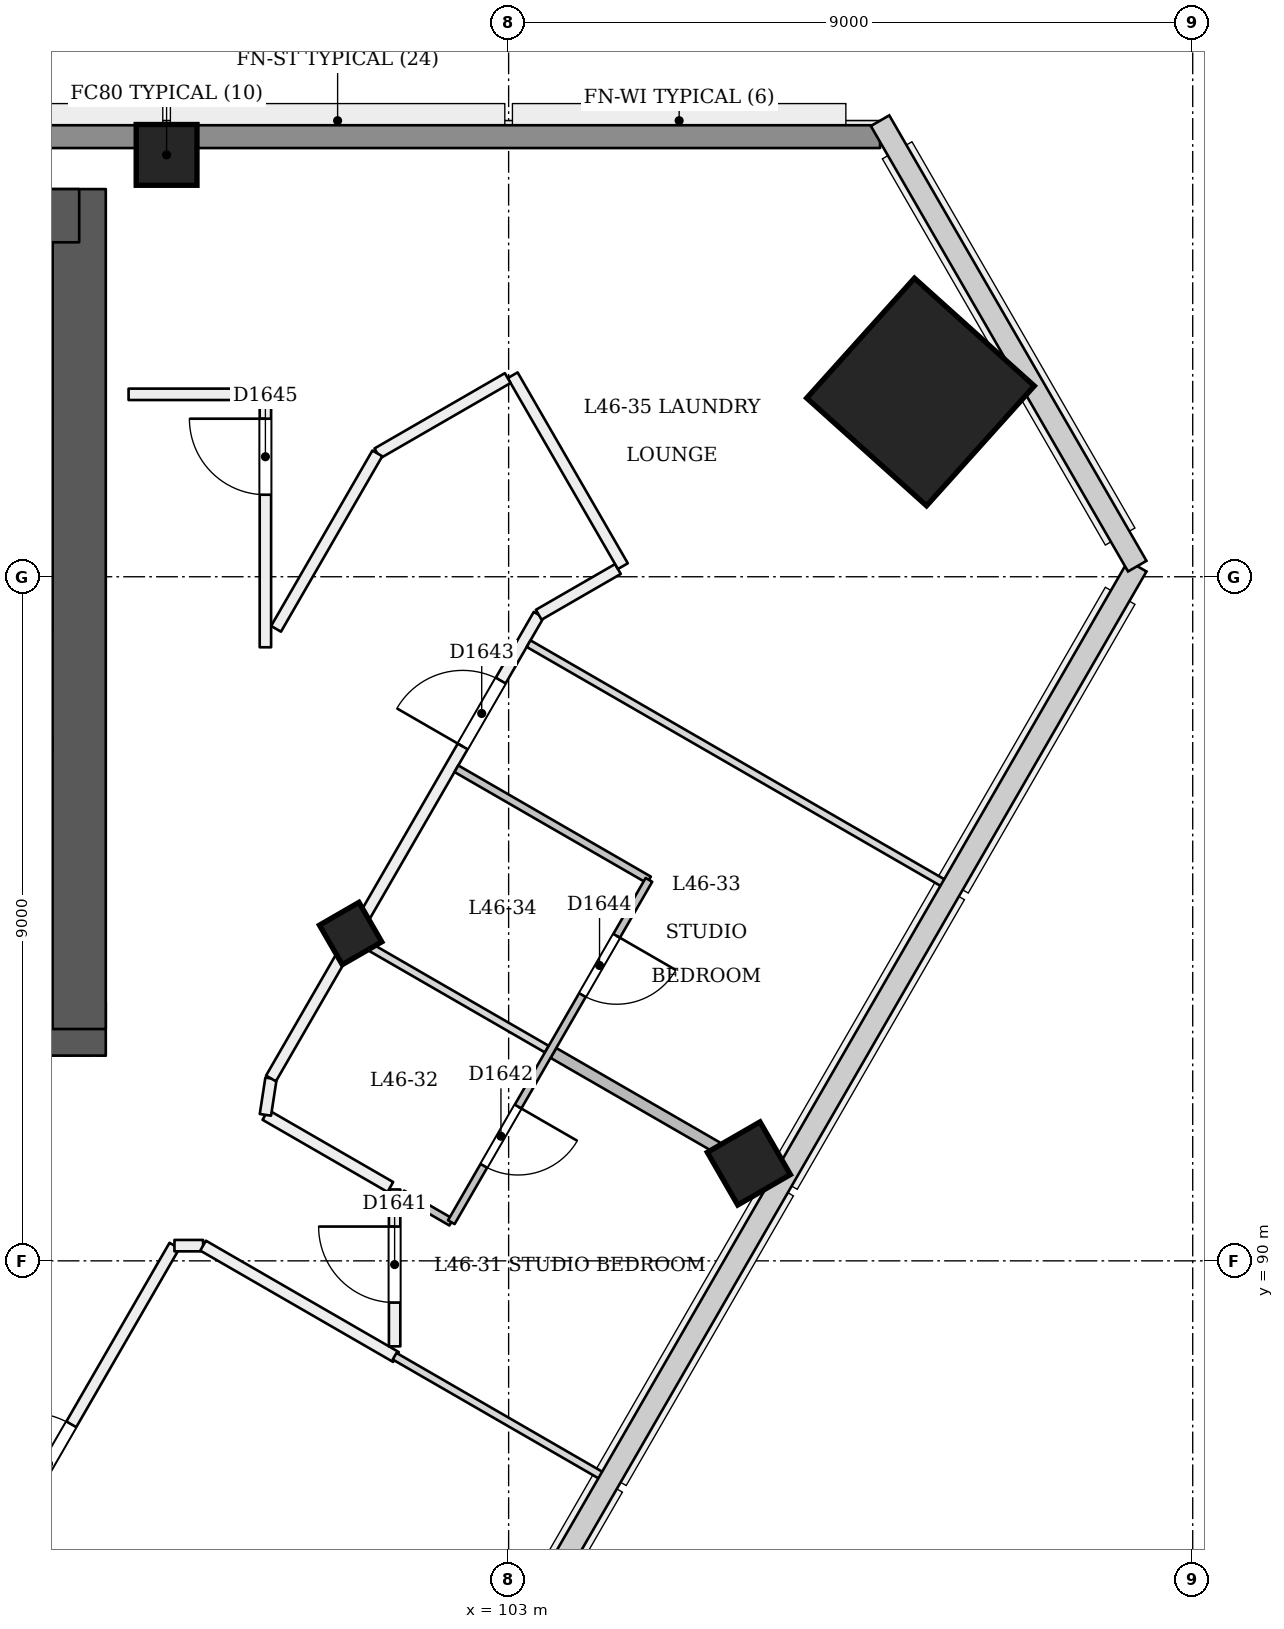
"""IFC4 building model, lengths in metres.
Left out: names, types, materials, properties, quantities, classifications, styles, units other than length and angle.
Written with IfcOpenShell. Run it as: python <this file> out.ifc"""

import sys

from ifc_helpers import new_model, si_unit, direction, frame, frame_2d, origin, origin_2d, place, context, subcontext, project, spatial, rectangle, extrude, element, fill, save


model = new_model("IFC4")
c1 = context("Model", 3, precision=1e-05, world=origin(), true_north=direction((0.0, 1.0)))
c2 = subcontext(c1, "Body", "Model", "MODEL_VIEW")
j1 = project(units=[si_unit("LENGTHUNIT", "METRE"), si_unit("PLANEANGLEUNIT", "RADIAN")], contexts=[c1])
p1 = place(None, origin())
s1 = spatial("IfcSite", under=j1, at=p1, CompositionType="ELEMENT")
p2 = place(p1, origin())
s2 = spatial("IfcBuilding", under=s1, at=p2, CompositionType="ELEMENT")
p3 = place(p2, frame((0.0, 0.0, 178.2)))
s3 = spatial("IfcBuildingStorey", under=s2, at=p3, CompositionType="ELEMENT", Elevation=178.2)
p4 = place(p3, frame((72.65, 93.05, 0.0), z_axis=(0.0, 0.0, 1.0), x_axis=(1.0, 0.0, 0.0)))
e1 = element("IfcWall", 1, at=p4, inside=s3, PredefinedType="SHEAR", context=c2, shape_type="SweptSolid", body=[
    extrude(rectangle(XDim=25.05, YDim=0.7, at=frame_2d((12.525, 0.0))), origin(), (0.0, 0.0, 1.0), 3.6),
])
p5 = place(p4, frame((1.15, 0.0, 0.0)))
e2 = element("IfcOpeningElement", 2, at=p5, cuts=e1, PredefinedType="OPENING", context=c2, shape_type="SweptSolid", body=[
    extrude(rectangle(XDim=1.2, YDim=2.1, at=frame_2d((0.6, 1.05))), frame((0.0, 0.36, 0.0), z_axis=(0.0, -1.0, 0.0), x_axis=(1.0, 0.0, 0.0)), (0.0, 0.0, 1.0), 0.721),
])
p6 = place(p4, frame((3.35, 0.0, 0.0)))
e3 = element("IfcOpeningElement", 3, at=p6, cuts=e1, PredefinedType="OPENING", context=c2, shape_type="SweptSolid", body=[
    extrude(rectangle(XDim=1.2, YDim=2.1, at=frame_2d((0.6, 1.05))), frame((0.0, 0.36, 0.0), z_axis=(0.0, -1.0, 0.0), x_axis=(1.0, 0.0, 0.0)), (0.0, 0.0, 1.0), 0.721),
])
p7 = place(p4, frame((13.35, 0.0, 0.0)))
e4 = element("IfcOpeningElement", 4, at=p7, cuts=e1, PredefinedType="OPENING", context=c2, shape_type="SweptSolid", body=[
    extrude(rectangle(XDim=1.2, YDim=2.1, at=frame_2d((0.6, 1.05))), frame((0.0, 0.36, 0.0), z_axis=(0.0, -1.0, 0.0), x_axis=(1.0, 0.0, 0.0)), (0.0, 0.0, 1.0), 0.721),
])
p8 = place(p4, frame((15.312, 0.0, 0.0)))
e5 = element("IfcOpeningElement", 5, at=p8, cuts=e1, PredefinedType="OPENING", context=c2, shape_type="SweptSolid", body=[
    extrude(rectangle(XDim=1.0, YDim=2.1, at=frame_2d((0.5, 1.05))), frame((0.0, 0.36, 0.0), z_axis=(0.0, -1.0, 0.0), x_axis=(1.0, 0.0, 0.0)), (0.0, 0.0, 1.0), 0.721),
])
p9 = place(p4, frame((18.15, 0.0, 0.0)))
e6 = element("IfcOpeningElement", 6, at=p9, cuts=e1, PredefinedType="OPENING", context=c2, shape_type="SweptSolid", body=[
    extrude(rectangle(XDim=1.0, YDim=2.1, at=frame_2d((0.5, 1.05))), frame((0.0, 0.36, 0.0), z_axis=(0.0, -1.0, 0.0), x_axis=(1.0, 0.0, 0.0)), (0.0, 0.0, 1.0), 0.721),
])
p10 = place(p4, frame((21.05, 0.0, 0.0)))
e7 = element("IfcOpeningElement", 7, at=p10, cuts=e1, PredefinedType="OPENING", context=c2, shape_type="SweptSolid", body=[
    extrude(rectangle(XDim=1.0, YDim=2.1, at=frame_2d((0.5, 1.05))), frame((0.0, 0.36, 0.0), z_axis=(0.0, -1.0, 0.0), x_axis=(1.0, 0.0, 0.0)), (0.0, 0.0, 1.0), 0.721),
])
p11 = place(p4, frame((22.938, 0.0, 0.0)))
e8 = element("IfcOpeningElement", 8, at=p11, cuts=e1, PredefinedType="OPENING", context=c2, shape_type="SweptSolid", body=[
    extrude(rectangle(XDim=1.0, YDim=2.1, at=frame_2d((0.5, 1.05))), frame((0.0, 0.36, 0.0), z_axis=(0.0, -1.0, 0.0), x_axis=(1.0, 0.0, 0.0)), (0.0, 0.0, 1.0), 0.721),
])
p12 = place(p3, frame((97.35, 93.05, 0.0), z_axis=(0.0, 0.0, 1.0), x_axis=(0.0, 1.0, 0.0)))
e9 = element("IfcWall", 9, at=p12, inside=s3, PredefinedType="SHEAR", context=c2, shape_type="SweptSolid", body=[
    extrude(rectangle(XDim=11.05, YDim=0.7, at=frame_2d((5.525, 0.0))), origin(), (0.0, 0.0, 1.0), 3.6),
])
p13 = place(p3, frame((97.35, 103.75, 0.0), z_axis=(0.0, 0.0, 1.0), x_axis=(-1.0, 0.0, 0.0)))
e10 = element("IfcWall", 10, at=p13, inside=s3, PredefinedType="SHEAR", context=c2, shape_type="SweptSolid", body=[
    extrude(rectangle(XDim=25.05, YDim=0.7, at=frame_2d((12.525, 0.0))), origin(), (0.0, 0.0, 1.0), 3.6),
])
p14 = place(p3, frame((100.948, 94.26, -0.018), z_axis=(-0.022222852987, 0.038483477124, 0.999012095419), x_axis=(-0.500174611287, -0.865639447942, 0.022219459744)))
e11 = element("IfcColumn", 11, at=p14, inside=s3, PredefinedType="COLUMN", context=c2, shape_type="SweptSolid", body=[
    extrude(rectangle(XDim=0.6, YDim=0.6, at=origin_2d()), origin(), (0.0, 0.0, 1.0), 3.604),
])
p15 = place(p3, frame((108.453, 101.42, 0.0), z_axis=(-0.028401796786, 0.009286506348, 0.999553449666), x_axis=(0.498873699713, -0.866389693121, 0.022224567214)))
e12 = element("IfcColumn", 12, at=p15, inside=s3, PredefinedType="COLUMN", context=c2, shape_type="SweptSolid", body=[
    extrude(rectangle(XDim=2.12, YDim=2.12, at=origin_2d()), origin(), (0.0, 0.0, 1.0), 3.602),
])
p16 = place(p3, frame((98.5, 104.55, 0.0), z_axis=(0.0, 0.0, 1.0), x_axis=(1.0, 0.0, 0.0)))
e13 = element("IfcColumn", 13, at=p16, inside=s3, PredefinedType="COLUMN", context=c2, shape_type="SweptSolid", body=[
    extrude(rectangle(XDim=0.8, YDim=0.8, at=origin_2d()), origin(), (0.0, 0.0, 1.0), 3.6),
])
p17 = place(p3, frame((106.188, 91.234, -0.024), z_axis=(-0.02215519141, 0.038415882353, 0.999016199807), x_axis=(-0.500657414572, -0.865361484564, 0.022173278208)))
e14 = element("IfcColumn", 14, at=p17, inside=s3, PredefinedType="COLUMN", context=c2, shape_type="SweptSolid", body=[
    extrude(rectangle(XDim=0.8, YDim=0.8, at=origin_2d()), origin(), (0.0, 0.0, 1.0), 3.604),
])
p18 = place(p3, frame((85.0, 66.638, 0.0), z_axis=(0.0, 0.0, 1.0), x_axis=(0.499999498748, 0.866025693182, 0.0)))
e15 = element("IfcWall", 15, at=p18, inside=s3, PredefinedType="PARTITIONING", context=c2, shape_type="SweptSolid", body=[
    extrude(rectangle(XDim=27.207, YDim=0.15, at=frame_2d((13.604, 0.0))), origin(), (0.0, 0.0, 1.0), 2.75),
])
p19 = place(p18, frame((1.0, 0.0, 0.0)))
e16 = element("IfcOpeningElement", 16, at=p19, cuts=e15, PredefinedType="OPENING", context=c2, shape_type="SweptSolid", body=[
    extrude(rectangle(XDim=1.0, YDim=2.1, at=frame_2d((0.5, 1.05))), frame((0.0, 0.085, 0.0), z_axis=(0.0, -1.0, 0.0), x_axis=(1.0, 0.0, 0.0)), (0.0, 0.0, 1.0), 0.171),
])
p20 = place(p18, frame((7.791, 0.0, 0.0)))
e17 = element("IfcOpeningElement", 17, at=p20, cuts=e15, PredefinedType="OPENING", context=c2, shape_type="SweptSolid", body=[
    extrude(rectangle(XDim=1.0, YDim=2.1, at=frame_2d((0.5, 1.05))), frame((0.0, 0.085, 0.0), z_axis=(0.0, -1.0, 0.0), x_axis=(1.0, 0.0, 0.0)), (0.0, 0.0, 1.0), 0.171),
])
p21 = place(p18, frame((10.0, 0.0, 0.0)))
e18 = element("IfcOpeningElement", 18, at=p21, cuts=e15, PredefinedType="OPENING", context=c2, shape_type="SweptSolid", body=[
    extrude(rectangle(XDim=1.0, YDim=2.1, at=frame_2d((0.5, 1.05))), frame((0.0, 0.085, 0.0), z_axis=(0.0, -1.0, 0.0), x_axis=(1.0, 0.0, 0.0)), (0.0, 0.0, 1.0), 0.171),
])
p22 = place(p18, frame((16.791, 0.0, 0.0)))
e19 = element("IfcOpeningElement", 19, at=p22, cuts=e15, PredefinedType="OPENING", context=c2, shape_type="SweptSolid", body=[
    extrude(rectangle(XDim=1.0, YDim=2.1, at=frame_2d((0.5, 1.05))), frame((0.0, 0.085, 0.0), z_axis=(0.0, -1.0, 0.0), x_axis=(1.0, 0.0, 0.0)), (0.0, 0.0, 1.0), 0.171),
])
p23 = place(p18, frame((23.293, 0.0, 0.0)))
e20 = element("IfcOpeningElement", 20, at=p23, cuts=e15, PredefinedType="OPENING", context=c2, shape_type="SweptSolid", body=[
    extrude(rectangle(XDim=1.2, YDim=2.1, at=frame_2d((0.6, 1.05))), frame((0.0, 0.085, 0.0), z_axis=(0.0, -1.0, 0.0), x_axis=(1.0, 0.0, 0.0)), (0.0, 0.0, 1.0), 0.171),
])
p24 = place(p3, frame((98.604, 90.2, 0.0), z_axis=(0.0, 0.0, 1.0), x_axis=(1.0, 0.0, 0.0)))
e21 = element("IfcWall", 21, at=p24, inside=s3, PredefinedType="PARTITIONING", context=c2, shape_type="SweptSolid", body=[
    extrude(rectangle(XDim=0.377, YDim=0.15, at=frame_2d((0.188, 0.0))), origin(), (0.0, 0.0, 1.0), 3.15),
])
p25 = place(p3, frame((98.98, 90.2, 0.0), z_axis=(0.0, 0.0, 1.0), x_axis=(0.866034304969, -0.49998458238, 0.0)))
e22 = element("IfcWall", 22, at=p25, inside=s3, PredefinedType="PARTITIONING", context=c2, shape_type="SweptSolid", body=[
    extrude(rectangle(XDim=2.929, YDim=0.15, at=frame_2d((1.465, 0.0))), origin(), (0.0, 0.0, 1.0), 3.15),
])
p26 = place(p3, frame((101.5, 88.875, 0.0), z_axis=(0.0, 0.0, 1.0), x_axis=(0.0, 1.0, 0.0)))
e23 = element("IfcWall", 23, at=p26, inside=s3, PredefinedType="PARTITIONING", context=c2, shape_type="SweptSolid", body=[
    extrude(rectangle(XDim=2.064, YDim=0.15, at=frame_2d((1.032, 0.0))), origin(), (0.0, 0.0, 1.0), 3.15),
])
p27 = place(p26, frame((0.576, 0.0, 0.0)))
e24 = element("IfcOpeningElement", 24, at=p27, cuts=e23, PredefinedType="OPENING", context=c2, shape_type="SweptSolid", body=[
    extrude(rectangle(XDim=1.0, YDim=2.1, at=frame_2d((0.5, 1.05))), frame((0.0, 0.085, 0.0), z_axis=(0.0, -1.0, 0.0), x_axis=(1.0, 0.0, 0.0)), (0.0, 0.0, 1.0), 0.171),
])
p28 = place(p3, frame((101.444, 90.972, 0.0), z_axis=(0.0, 0.0, 1.0), x_axis=(-0.866042076863, 0.499971120268, 0.0)))
e25 = element("IfcWall", 25, at=p28, inside=s3, PredefinedType="PARTITIONING", context=c2, shape_type="SweptSolid", body=[
    extrude(rectangle(XDim=1.898, YDim=0.15, at=frame_2d((0.949, 0.0))), origin(), (0.0, 0.0, 1.0), 3.15),
])
p29 = place(p3, frame((99.8, 91.921, 0.0), z_axis=(0.0, 0.0, 1.0), x_axis=(0.152057184254, 0.988371697651, 0.0)))
e26 = element("IfcWall", 26, at=p29, inside=s3, PredefinedType="PARTITIONING", context=c2, shape_type="SweptSolid", body=[
    extrude(rectangle(XDim=0.485, YDim=0.15, at=frame_2d((0.242, 0.0))), origin(), (0.0, 0.0, 1.0), 3.15),
])
p30 = place(p3, frame((99.874, 92.4, 0.0), z_axis=(0.0, 0.0, 1.0), x_axis=(0.499982483372, 0.866035516778, 0.0)))
e27 = element("IfcWall", 27, at=p30, inside=s3, PredefinedType="PARTITIONING", context=c2, shape_type="SweptSolid", body=[
    extrude(rectangle(XDim=7.044, YDim=0.15, at=frame_2d((3.522, 0.0))), origin(), (0.0, 0.0, 1.0), 2.75),
])
p31 = place(p30, frame((5.044, 0.0, 0.0)))
e28 = element("IfcOpeningElement", 28, at=p31, cuts=e27, PredefinedType="OPENING", context=c2, shape_type="SweptSolid", body=[
    extrude(rectangle(XDim=1.0, YDim=2.1, at=frame_2d((0.5, 1.05))), frame((0.0, 0.085, 0.0), z_axis=(0.0, -1.0, 0.0), x_axis=(1.0, 0.0, 0.0)), (0.0, 0.0, 1.0), 0.171),
])
p32 = place(p3, frame((103.396, 98.5, 0.0), z_axis=(0.0, 0.0, 1.0), x_axis=(0.86605048973, 0.49995654735, 0.0)))
e29 = element("IfcWall", 29, at=p32, inside=s3, PredefinedType="PARTITIONING", context=c2, shape_type="SweptSolid", body=[
    extrude(rectangle(XDim=1.204, YDim=0.15, at=frame_2d((0.602, 0.0))), origin(), (0.0, 0.0, 1.0), 3.15),
])
p33 = place(p3, frame((104.503, 99.139, 0.0), z_axis=(0.0, 0.0, 1.0), x_axis=(-0.499987231761, 0.866032775405, 0.0)))
e30 = element("IfcWall", 30, at=p33, inside=s3, PredefinedType="PARTITIONING", context=c2, shape_type="SweptSolid", body=[
    extrude(rectangle(XDim=2.9, YDim=0.15, at=frame_2d((1.45, 0.0))), origin(), (0.0, 0.0, 1.0), 3.15),
])
p34 = place(p3, frame((102.988, 101.613, 0.0), z_axis=(0.0, 0.0, 1.0), x_axis=(-0.866050114754, -0.499957196903, 0.0)))
e31 = element("IfcWall", 31, at=p34, inside=s3, PredefinedType="PARTITIONING", context=c2, shape_type="SweptSolid", body=[
    extrude(rectangle(XDim=1.981, YDim=0.15, at=frame_2d((0.99, 0.0))), origin(), (0.0, 0.0, 1.0), 3.15),
])
p35 = place(p3, frame((101.273, 100.623, 0.0), z_axis=(0.0, 0.0, 1.0), x_axis=(-0.500010524421, -0.866019327422, 0.0)))
e32 = element("IfcWall", 32, at=p35, inside=s3, PredefinedType="PARTITIONING", context=c2, shape_type="SweptSolid", body=[
    extrude(rectangle(XDim=2.666, YDim=0.15, at=frame_2d((1.333, 0.0))), origin(), (0.0, 0.0, 1.0), 3.15),
])
p36 = place(p3, frame((99.8, 98.072, 0.0), z_axis=(0.0, 0.0, 1.0), x_axis=(0.0, 1.0, 0.0)))
e33 = element("IfcWall", 33, at=p36, inside=s3, PredefinedType="PARTITIONING", context=c2, shape_type="SweptSolid", body=[
    extrude(rectangle(XDim=3.328, YDim=0.15, at=frame_2d((1.664, 0.0))), origin(), (0.0, 0.0, 1.0), 3.15),
])
p37 = place(p36, frame((2.007, 0.0, 0.0)))
e34 = element("IfcOpeningElement", 34, at=p37, cuts=e33, PredefinedType="OPENING", context=c2, shape_type="SweptSolid", body=[
    extrude(rectangle(XDim=1.0, YDim=2.1, at=frame_2d((0.5, 1.05))), frame((0.0, 0.085, 0.0), z_axis=(0.0, -1.0, 0.0), x_axis=(1.0, 0.0, 0.0)), (0.0, 0.0, 1.0), 0.171),
])
p38 = place(p3, frame((99.725, 101.4, 0.0), z_axis=(0.0, 0.0, 1.0), x_axis=(-1.0, 0.0, 0.0)))
e35 = element("IfcWall", 35, at=p38, inside=s3, PredefinedType="PARTITIONING", context=c2, shape_type="SweptSolid", body=[
    extrude(rectangle(XDim=1.725, YDim=0.15, at=frame_2d((0.863, 0.0))), origin(), (0.0, 0.0, 1.0), 3.15),
])
p39 = place(p3, frame((104.258, 87.153, 0.0), z_axis=(0.0, 0.0, 1.0), x_axis=(-0.866017059223, 0.500014452926, 0.0)))
e36 = element("IfcWall", 36, at=p39, inside=s3, PredefinedType="PARTITIONING", context=c2, shape_type="SweptSolid", body=[
    extrude(rectangle(XDim=3.185, YDim=0.1, at=frame_2d((1.592, 0.0))), origin(), (0.0, 0.0, 1.0), 2.65),
])
p40 = place(p3, frame((102.246, 90.509, 0.0), z_axis=(0.0, 0.0, 1.0), x_axis=(-0.865896584481, 0.500223055231, 0.0)))
e37 = element("IfcWall", 37, at=p40, inside=s3, PredefinedType="PARTITIONING", context=c2, shape_type="SweptSolid", body=[
    extrude(rectangle(XDim=0.746, YDim=0.1, at=frame_2d((0.373, 0.0))), origin(), (0.0, 0.0, 1.0), 3.15),
])
p41 = place(p3, frame((106.49, 91.06, 0.0), z_axis=(0.0, 0.0, 1.0), x_axis=(-0.866032680314, 0.499987396469, 0.0)))
e38 = element("IfcWall", 38, at=p41, inside=s3, PredefinedType="PARTITIONING", context=c2, shape_type="SweptSolid", body=[
    extrude(rectangle(XDim=3.35, YDim=0.15, at=frame_2d((1.675, 0.0))), origin(), (0.0, 0.0, 1.0), 2.65),
])
p42 = place(p3, frame((103.503, 92.785, 0.0), z_axis=(0.0, 0.0, 1.0), x_axis=(-0.866076708598, 0.499911126926, 0.0)))
e39 = element("IfcWall", 39, at=p42, inside=s3, PredefinedType="PARTITIONING", context=c2, shape_type="SweptSolid", body=[
    extrude(rectangle(XDim=2.875, YDim=0.1, at=frame_2d((1.438, 0.0))), origin(), (0.0, 0.0, 1.0), 2.75),
])
p43 = place(p3, frame((102.313, 96.474, 0.0), z_axis=(0.0, 0.0, 1.0), x_axis=(0.866046596414, -0.499963291492, 0.0)))
e40 = element("IfcWall", 40, at=p43, inside=s3, PredefinedType="PARTITIONING", context=c2, shape_type="SweptSolid", body=[
    extrude(rectangle(XDim=2.925, YDim=0.1, at=frame_2d((1.462, 0.0))), origin(), (0.0, 0.0, 1.0), 3.15),
])
p44 = place(p3, frame((104.846, 95.012, 0.0), z_axis=(0.0, 0.0, 1.0), x_axis=(-0.500006934395, -0.866021400173, 0.0)))
e41 = element("IfcWall", 41, at=p44, inside=s3, PredefinedType="PARTITIONING", context=c2, shape_type="SweptSolid", body=[
    extrude(rectangle(XDim=5.2, YDim=0.1, at=frame_2d((2.6, 0.0))), origin(), (0.0, 0.0, 1.0), 2.75),
])
p45 = place(p44, frame((3.444, 0.0, 0.0)))
e42 = element("IfcOpeningElement", 42, at=p45, cuts=e41, PredefinedType="OPENING", context=c2, shape_type="SweptSolid", body=[
    extrude(rectangle(XDim=0.9, YDim=2.1, at=frame_2d((0.45, 1.05))), frame((0.0, 0.061, 0.0), z_axis=(0.0, -1.0, 0.0), x_axis=(1.0, 0.0, 0.0)), (0.0, 0.0, 1.0), 0.121),
])
p46 = place(p44, frame((0.85, 0.0, 0.0)))
e43 = element("IfcOpeningElement", 43, at=p46, cuts=e41, PredefinedType="OPENING", context=c2, shape_type="SweptSolid", body=[
    extrude(rectangle(XDim=0.9, YDim=2.1, at=frame_2d((0.45, 1.05))), frame((0.0, 0.061, 0.0), z_axis=(0.0, -1.0, 0.0), x_axis=(1.0, 0.0, 0.0)), (0.0, 0.0, 1.0), 0.121),
])
p47 = place(p3, frame((108.758, 94.947, 0.0), z_axis=(0.0, 0.0, 1.0), x_axis=(-0.866025401434, 0.500000004071, 0.0)))
e44 = element("IfcWall", 44, at=p47, inside=s3, PredefinedType="PARTITIONING", context=c2, shape_type="SweptSolid", body=[
    extrude(rectangle(XDim=6.345, YDim=0.1, at=frame_2d((3.173, 0.0))), origin(), (0.0, 0.0, 1.0), 2.65),
])
p48 = place(p3, frame((62.113, 104.79, 0.0), z_axis=(0.0, 0.0, 1.0), x_axis=(1.0, 0.0, 0.0)))
e45 = element("IfcWall", 45, at=p48, inside=s3, PredefinedType="SOLIDWALL", context=c2, shape_type="SweptSolid", body=[
    extrude(rectangle(XDim=45.773, YDim=0.3, at=frame_2d((22.887, 0.0))), origin(), (0.0, 0.0, 1.0), 2.65),
])
p49 = place(p23, origin())
e46 = element("IfcDoor", 46, at=p49, inside=s3, OperationType="SINGLE_SWING_LEFT", PredefinedType="NOTDEFINED", context=c2, shape_type="SweptSolid", body=[
    extrude(rectangle(XDim=1.2, YDim=2.1, at=frame_2d((0.6, 1.05))), frame((0.0, 0.025, 0.0), z_axis=(0.0, -1.0, 0.0), x_axis=(1.0, 0.0, 0.0)), (0.0, 0.0, 1.0), 0.05),
])
fill(e20, e46)
p50 = place(p27, origin())
e47 = element("IfcDoor", 47, at=p50, inside=s3, OperationType="SINGLE_SWING_RIGHT", PredefinedType="NOTDEFINED", context=c2, shape_type="SweptSolid", body=[
    extrude(rectangle(XDim=1.0, YDim=2.1, at=frame_2d((0.5, 1.05))), frame((0.0, 0.025, 0.0), z_axis=(0.0, -1.0, 0.0), x_axis=(1.0, 0.0, 0.0)), (0.0, 0.0, 1.0), 0.05),
])
fill(e24, e47)
p51 = place(p45, origin())
e48 = element("IfcDoor", 48, at=p51, inside=s3, OperationType="SINGLE_SWING_LEFT", PredefinedType="NOTDEFINED", context=c2, shape_type="SweptSolid", body=[
    extrude(rectangle(XDim=0.9, YDim=2.1, at=frame_2d((0.45, 1.05))), frame((0.0, 0.025, 0.0), z_axis=(0.0, -1.0, 0.0), x_axis=(1.0, 0.0, 0.0)), (0.0, 0.0, 1.0), 0.05),
])
fill(e42, e48)
p52 = place(p31, origin())
e49 = element("IfcDoor", 49, at=p52, inside=s3, OperationType="SINGLE_SWING_LEFT", PredefinedType="NOTDEFINED", context=c2, shape_type="SweptSolid", body=[
    extrude(rectangle(XDim=1.0, YDim=2.1, at=frame_2d((0.5, 1.05))), frame((0.0, 0.025, 0.0), z_axis=(0.0, -1.0, 0.0), x_axis=(1.0, 0.0, 0.0)), (0.0, 0.0, 1.0), 0.05),
])
fill(e28, e49)
p53 = place(p46, origin())
e50 = element("IfcDoor", 50, at=p53, inside=s3, OperationType="SINGLE_SWING_LEFT", PredefinedType="NOTDEFINED", context=c2, shape_type="SweptSolid", body=[
    extrude(rectangle(XDim=0.9, YDim=2.1, at=frame_2d((0.45, 1.05))), frame((0.0, 0.025, 0.0), z_axis=(0.0, -1.0, 0.0), x_axis=(1.0, 0.0, 0.0)), (0.0, 0.0, 1.0), 0.05),
])
fill(e43, e50)
p54 = place(p37, origin())
e51 = element("IfcDoor", 51, at=p54, inside=s3, OperationType="SINGLE_SWING_RIGHT", PredefinedType="NOTDEFINED", context=c2, shape_type="SweptSolid", body=[
    extrude(rectangle(XDim=1.0, YDim=2.1, at=frame_2d((0.5, 1.05))), frame((0.0, 0.025, 0.0), z_axis=(0.0, -1.0, 0.0), x_axis=(1.0, 0.0, 0.0)), (0.0, 0.0, 1.0), 0.05),
])
fill(e34, e51)
save(model, sys.argv[1])
